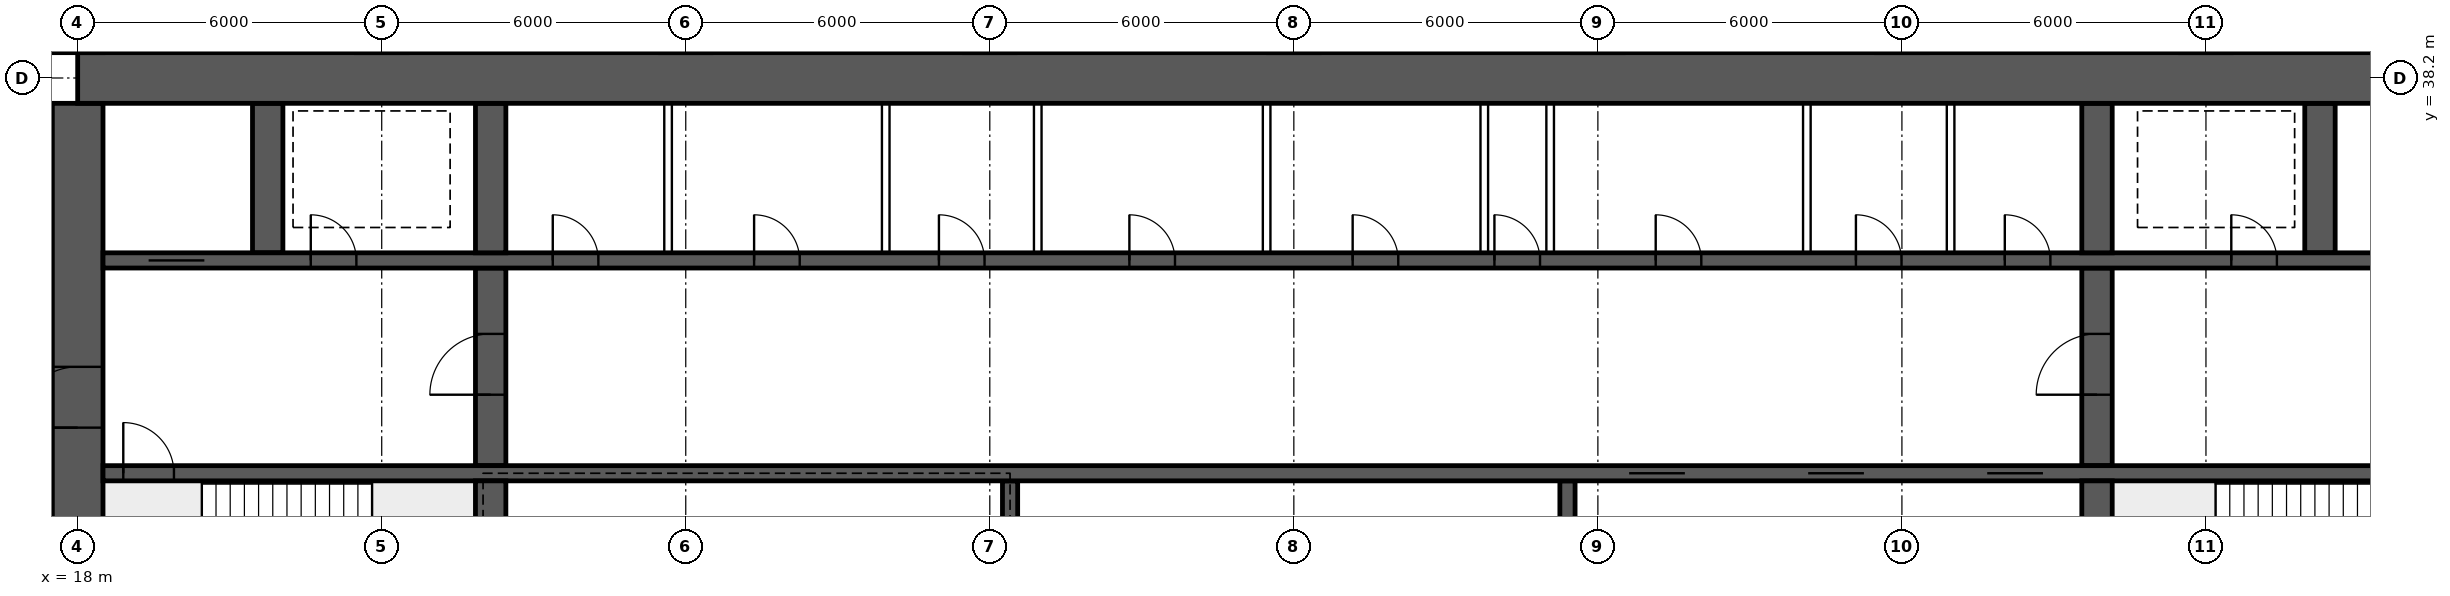
"""IFC4 building model, lengths in metres.
Left out: names, types, materials, properties, quantities, classifications, styles, units other than length and angle.
Written with IfcOpenShell. Run it as: python <this file> out.ifc"""

import sys

from ifc_helpers import new_model, si_unit, direction, frame, frame_2d, origin, place, context, subcontext, project, spatial, rectangle, extrude, element, fill, save


model = new_model("IFC4")
c1 = context("Model", 3, precision=1e-05, world=origin(), true_north=direction((0.0, 1.0)))
c2 = subcontext(c1, "Body", "Model", "MODEL_VIEW")
j1 = project(units=[si_unit("LENGTHUNIT", "METRE"), si_unit("PLANEANGLEUNIT", "RADIAN")], contexts=[c1])
p1 = place(None, origin())
s1 = spatial("IfcSite", under=j1, at=p1, CompositionType="ELEMENT")
p2 = place(p1, origin())
s2 = spatial("IfcBuilding", under=s1, at=p2, CompositionType="ELEMENT")
p3 = place(p2, frame((0.0, 0.0, -4.5)))
s3 = spatial("IfcBuildingStorey", under=s2, at=p3, CompositionType="ELEMENT", Elevation=-4.5)
p4 = place(p3, frame((18.0, 38.2, 0.0), z_axis=(0.0, 0.0, 1.0), x_axis=(1.0, 0.0, 0.0)))
e1 = element("IfcWall", 1, at=p4, inside=s3, PredefinedType="SHEAR", context=c2, shape_type="SweptSolid", body=[
    extrude(rectangle(XDim=48.0, YDim=1.0, at=frame_2d((24.0, 0.0))), origin(), (0.0, 0.0, 1.0), 4.5),
])
p5 = place(p3, frame((18.0, 26.3, 0.0), z_axis=(0.0, 0.0, 1.0), x_axis=(0.0, 1.0, 0.0)))
e2 = element("IfcWall", 2, at=p5, inside=s3, PredefinedType="SHEAR", context=c2, shape_type="SweptSolid", body=[
    extrude(rectangle(XDim=11.4, YDim=1.0, at=frame_2d((5.7, 0.0))), origin(), (0.0, 0.0, 1.0), 4.5),
])
p6 = place(p5, frame((5.0, 0.0, 0.0)))
e3 = element("IfcOpeningElement", 3, at=p6, cuts=e2, PredefinedType="OPENING", context=c2, shape_type="SweptSolid", body=[
    extrude(rectangle(XDim=1.2, YDim=2.1, at=frame_2d((0.6, 1.05))), frame((0.0, 0.51, 0.0), z_axis=(0.0, -1.0, 0.0), x_axis=(1.0, 0.0, 0.0)), (0.0, 0.0, 1.0), 1.02),
])
p7 = place(p3, frame((18.5, 30.4, 0.0), z_axis=(0.0, 0.0, 1.0), x_axis=(1.0, 0.0, 0.0)))
e4 = element("IfcWall", 4, at=p7, inside=s3, PredefinedType="SHEAR", context=c2, shape_type="SweptSolid", body=[
    extrude(rectangle(XDim=47.0, YDim=0.3, at=frame_2d((23.5, 0.0))), origin(), (0.0, 0.0, 1.0), 4.5),
])
p8 = place(p7, frame((0.4, 0.0, 0.0)))
e5 = element("IfcOpeningElement", 5, at=p8, cuts=e4, PredefinedType="OPENING", context=c2, shape_type="SweptSolid", body=[
    extrude(rectangle(XDim=1.0, YDim=2.1, at=frame_2d((0.5, 1.05))), frame((0.0, 0.16, 0.0), z_axis=(0.0, -1.0, 0.0), x_axis=(1.0, 0.0, 0.0)), (0.0, 0.0, 1.0), 0.32),
])
p9 = place(p7, frame((45.6, 0.0, 0.0)))
e6 = element("IfcOpeningElement", 6, at=p9, cuts=e4, PredefinedType="OPENING", context=c2, shape_type="SweptSolid", body=[
    extrude(rectangle(XDim=1.0, YDim=2.1, at=frame_2d((0.5, 1.05))), frame((0.0, 0.16, 0.0), z_axis=(0.0, -1.0, 0.0), x_axis=(1.0, 0.0, 0.0)), (0.0, 0.0, 1.0), 0.32),
])
p10 = place(p7, frame((30.117, 0.0, 0.0)))
e7 = element("IfcOpeningElement", 7, at=p10, cuts=e4, PredefinedType="OPENING", context=c2, shape_type="SweptSolid", body=[
    extrude(rectangle(XDim=1.1, YDim=2.1, at=frame_2d((0.55, 1.05))), frame((0.0, 0.16, 0.0), z_axis=(0.0, -1.0, 0.0), x_axis=(1.0, 0.0, 0.0)), (0.0, 0.0, 1.0), 0.32),
])
p11 = place(p7, frame((33.65, 0.0, 0.0)))
e8 = element("IfcOpeningElement", 8, at=p11, cuts=e4, PredefinedType="OPENING", context=c2, shape_type="SweptSolid", body=[
    extrude(rectangle(XDim=1.1, YDim=2.1, at=frame_2d((0.55, 1.05))), frame((0.0, 0.16, 0.0), z_axis=(0.0, -1.0, 0.0), x_axis=(1.0, 0.0, 0.0)), (0.0, 0.0, 1.0), 0.32),
])
p12 = place(p7, frame((37.183, 0.0, 0.0)))
e9 = element("IfcOpeningElement", 9, at=p12, cuts=e4, PredefinedType="OPENING", context=c2, shape_type="SweptSolid", body=[
    extrude(rectangle(XDim=1.1, YDim=2.1, at=frame_2d((0.55, 1.05))), frame((0.0, 0.16, 0.0), z_axis=(0.0, -1.0, 0.0), x_axis=(1.0, 0.0, 0.0)), (0.0, 0.0, 1.0), 0.32),
])
p13 = place(p3, frame((18.5, 34.6, 0.0), z_axis=(0.0, 0.0, 1.0), x_axis=(1.0, 0.0, 0.0)))
e10 = element("IfcWall", 10, at=p13, inside=s3, PredefinedType="SHEAR", context=c2, shape_type="SweptSolid", body=[
    extrude(rectangle(XDim=47.0, YDim=0.3, at=frame_2d((23.5, 0.0))), origin(), (0.0, 0.0, 1.0), 4.5),
])
p14 = place(p13, frame((0.9, 0.0, 0.0)))
e11 = element("IfcOpeningElement", 11, at=p14, cuts=e10, PredefinedType="OPENING", context=c2, shape_type="SweptSolid", body=[
    extrude(rectangle(XDim=1.1, YDim=2.1, at=frame_2d((0.55, 1.05))), frame((0.0, 0.16, 0.0), z_axis=(0.0, -1.0, 0.0), x_axis=(1.0, 0.0, 0.0)), (0.0, 0.0, 1.0), 0.32),
])
p15 = place(p13, frame((45.0, 0.0, 0.0)))
e12 = element("IfcOpeningElement", 12, at=p15, cuts=e10, PredefinedType="OPENING", context=c2, shape_type="SweptSolid", body=[
    extrude(rectangle(XDim=1.1, YDim=2.1, at=frame_2d((0.55, 1.05))), frame((0.0, 0.16, 0.0), z_axis=(0.0, -1.0, 0.0), x_axis=(1.0, 0.0, 0.0)), (0.0, 0.0, 1.0), 0.32),
])
p16 = place(p13, frame((4.1, 0.0, 0.0)))
e13 = element("IfcOpeningElement", 13, at=p16, cuts=e10, PredefinedType="OPENING", context=c2, shape_type="SweptSolid", body=[
    extrude(rectangle(XDim=0.9, YDim=2.1, at=frame_2d((0.45, 1.05))), frame((0.0, 0.16, 0.0), z_axis=(0.0, -1.0, 0.0), x_axis=(1.0, 0.0, 0.0)), (0.0, 0.0, 1.0), 0.32),
])
p17 = place(p13, frame((42.0, 0.0, 0.0)))
e14 = element("IfcOpeningElement", 14, at=p17, cuts=e10, PredefinedType="OPENING", context=c2, shape_type="SweptSolid", body=[
    extrude(rectangle(XDim=0.9, YDim=2.1, at=frame_2d((0.45, 1.05))), frame((0.0, 0.16, 0.0), z_axis=(0.0, -1.0, 0.0), x_axis=(1.0, 0.0, 0.0)), (0.0, 0.0, 1.0), 0.32),
])
p18 = place(p13, frame((8.875, 0.0, 0.0)))
e15 = element("IfcOpeningElement", 15, at=p18, cuts=e10, PredefinedType="OPENING", context=c2, shape_type="SweptSolid", body=[
    extrude(rectangle(XDim=0.9, YDim=2.1, at=frame_2d((0.45, 1.05))), frame((0.0, 0.16, 0.0), z_axis=(0.0, -1.0, 0.0), x_axis=(1.0, 0.0, 0.0)), (0.0, 0.0, 1.0), 0.32),
])
p19 = place(p13, frame((12.849, 0.0, 0.0)))
e16 = element("IfcOpeningElement", 16, at=p19, cuts=e10, PredefinedType="OPENING", context=c2, shape_type="SweptSolid", body=[
    extrude(rectangle(XDim=0.9, YDim=2.1, at=frame_2d((0.45, 1.05))), frame((0.0, 0.16, 0.0), z_axis=(0.0, -1.0, 0.0), x_axis=(1.0, 0.0, 0.0)), (0.0, 0.0, 1.0), 0.32),
])
p20 = place(p13, frame((16.496, 0.0, 0.0)))
e17 = element("IfcOpeningElement", 17, at=p20, cuts=e10, PredefinedType="OPENING", context=c2, shape_type="SweptSolid", body=[
    extrude(rectangle(XDim=0.9, YDim=2.1, at=frame_2d((0.45, 1.05))), frame((0.0, 0.16, 0.0), z_axis=(0.0, -1.0, 0.0), x_axis=(1.0, 0.0, 0.0)), (0.0, 0.0, 1.0), 0.32),
])
p21 = place(p13, frame((20.255, 0.0, 0.0)))
e18 = element("IfcOpeningElement", 18, at=p21, cuts=e10, PredefinedType="OPENING", context=c2, shape_type="SweptSolid", body=[
    extrude(rectangle(XDim=0.9, YDim=2.1, at=frame_2d((0.45, 1.05))), frame((0.0, 0.16, 0.0), z_axis=(0.0, -1.0, 0.0), x_axis=(1.0, 0.0, 0.0)), (0.0, 0.0, 1.0), 0.32),
])
p22 = place(p13, frame((24.661, 0.0, 0.0)))
e19 = element("IfcOpeningElement", 19, at=p22, cuts=e10, PredefinedType="OPENING", context=c2, shape_type="SweptSolid", body=[
    extrude(rectangle(XDim=0.9, YDim=2.1, at=frame_2d((0.45, 1.05))), frame((0.0, 0.16, 0.0), z_axis=(0.0, -1.0, 0.0), x_axis=(1.0, 0.0, 0.0)), (0.0, 0.0, 1.0), 0.32),
])
p23 = place(p13, frame((27.458, 0.0, 0.0)))
e20 = element("IfcOpeningElement", 20, at=p23, cuts=e10, PredefinedType="OPENING", context=c2, shape_type="SweptSolid", body=[
    extrude(rectangle(XDim=0.9, YDim=2.1, at=frame_2d((0.45, 1.05))), frame((0.0, 0.16, 0.0), z_axis=(0.0, -1.0, 0.0), x_axis=(1.0, 0.0, 0.0)), (0.0, 0.0, 1.0), 0.32),
])
p24 = place(p13, frame((30.641, 0.0, 0.0)))
e21 = element("IfcOpeningElement", 21, at=p24, cuts=e10, PredefinedType="OPENING", context=c2, shape_type="SweptSolid", body=[
    extrude(rectangle(XDim=0.9, YDim=2.1, at=frame_2d((0.45, 1.05))), frame((0.0, 0.16, 0.0), z_axis=(0.0, -1.0, 0.0), x_axis=(1.0, 0.0, 0.0)), (0.0, 0.0, 1.0), 0.32),
])
p25 = place(p13, frame((34.592, 0.0, 0.0)))
e22 = element("IfcOpeningElement", 22, at=p25, cuts=e10, PredefinedType="OPENING", context=c2, shape_type="SweptSolid", body=[
    extrude(rectangle(XDim=0.9, YDim=2.1, at=frame_2d((0.45, 1.05))), frame((0.0, 0.16, 0.0), z_axis=(0.0, -1.0, 0.0), x_axis=(1.0, 0.0, 0.0)), (0.0, 0.0, 1.0), 0.32),
])
p26 = place(p13, frame((37.53, 0.0, 0.0)))
e23 = element("IfcOpeningElement", 23, at=p26, cuts=e10, PredefinedType="OPENING", context=c2, shape_type="SweptSolid", body=[
    extrude(rectangle(XDim=0.9, YDim=2.1, at=frame_2d((0.45, 1.05))), frame((0.0, 0.16, 0.0), z_axis=(0.0, -1.0, 0.0), x_axis=(1.0, 0.0, 0.0)), (0.0, 0.0, 1.0), 0.32),
])
for number, where, z_axis, x_axis in (
    (24, (26.15, 26.3, 0.0), (0.0, 0.0, 1.0), (0.0, 1.0, 0.0)),
    (25, (57.85, 26.3, 0.0), (0.0, 0.0, 1.0), (0.0, 1.0, 0.0)),
):
    element("IfcWall", number, at=place(p3, frame(where, z_axis=z_axis, x_axis=x_axis)), inside=s3, PredefinedType="SHEAR", context=c2, shape_type="SweptSolid", body=[
        extrude(rectangle(XDim=3.95, YDim=0.6, at=frame_2d((1.975, 0.0))), origin(), (0.0, 0.0, 1.0), 4.5),
    ])
p27 = place(p3, frame((26.15, 30.55, 0.0), z_axis=(0.0, 0.0, 1.0), x_axis=(0.0, 1.0, 0.0)))
e26 = element("IfcWall", 26, at=p27, inside=s3, PredefinedType="SHEAR", context=c2, shape_type="SweptSolid", body=[
    extrude(rectangle(XDim=3.9, YDim=0.6, at=frame_2d((1.95, 0.0))), origin(), (0.0, 0.0, 1.0), 4.5),
])
p28 = place(p27, frame((1.4, 0.0, 0.0)))
e27 = element("IfcOpeningElement", 27, at=p28, cuts=e26, PredefinedType="OPENING", context=c2, shape_type="SweptSolid", body=[
    extrude(rectangle(XDim=1.2, YDim=2.1, at=frame_2d((0.6, 1.05))), frame((0.0, 0.31, 0.0), z_axis=(0.0, -1.0, 0.0), x_axis=(1.0, 0.0, 0.0)), (0.0, 0.0, 1.0), 0.62),
])
p29 = place(p3, frame((57.85, 30.55, 0.0), z_axis=(0.0, 0.0, 1.0), x_axis=(0.0, 1.0, 0.0)))
e28 = element("IfcWall", 28, at=p29, inside=s3, PredefinedType="SHEAR", context=c2, shape_type="SweptSolid", body=[
    extrude(rectangle(XDim=3.9, YDim=0.6, at=frame_2d((1.95, 0.0))), origin(), (0.0, 0.0, 1.0), 4.5),
])
p30 = place(p29, frame((1.4, 0.0, 0.0)))
e29 = element("IfcOpeningElement", 29, at=p30, cuts=e28, PredefinedType="OPENING", context=c2, shape_type="SweptSolid", body=[
    extrude(rectangle(XDim=1.2, YDim=2.1, at=frame_2d((0.6, 1.05))), frame((0.0, 0.31, 0.0), z_axis=(0.0, -1.0, 0.0), x_axis=(1.0, 0.0, 0.0)), (0.0, 0.0, 1.0), 0.62),
])
for number, where, z_axis, x_axis in (
    (30, (21.75, 34.75, 0.0), (0.0, 0.0, 1.0), (0.0, 1.0, 0.0)),
    (31, (62.25, 34.75, 0.0), (0.0, 0.0, 1.0), (0.0, 1.0, 0.0)),
    (32, (26.15, 34.75, 0.0), (0.0, 0.0, 1.0), (0.0, 1.0, 0.0)),
    (33, (57.85, 34.75, 0.0), (0.0, 0.0, 1.0), (0.0, 1.0, 0.0)),
):
    element("IfcWall", number, at=place(p3, frame(where, z_axis=z_axis, x_axis=x_axis)), inside=s3, PredefinedType="SHEAR", context=c2, shape_type="SweptSolid", body=[
        extrude(rectangle(XDim=2.95, YDim=0.6, at=frame_2d((1.475, 0.0))), origin(), (0.0, 0.0, 1.0), 4.5),
    ])
for number, where, z_axis, x_axis in (
    (34, (36.4, 26.3, 0.0), (0.0, 0.0, 1.0), (0.0, 1.0, 0.0)),
    (35, (47.4, 26.3, 0.0), (0.0, 0.0, 1.0), (0.0, 1.0, 0.0)),
):
    element("IfcWall", number, at=place(p3, frame(where, z_axis=z_axis, x_axis=x_axis)), inside=s3, PredefinedType="SHEAR", context=c2, shape_type="SweptSolid", body=[
        extrude(rectangle(XDim=3.95, YDim=0.3, at=frame_2d((1.975, 0.0))), origin(), (0.0, 0.0, 1.0), 4.5),
    ])
for number, where, z_axis, x_axis in (
    (36, (29.651, 34.75, 0.0), (0.0, 0.0, 1.0), (0.0, 1.0, 0.0)),
    (37, (33.946, 34.75, 0.0), (0.0, 0.0, 1.0), (0.0, 1.0, 0.0)),
    (38, (36.946, 34.75, 0.0), (0.0, 0.0, 1.0), (0.0, 1.0, 0.0)),
    (39, (41.463, 34.75, 0.0), (0.0, 0.0, 1.0), (0.0, 1.0, 0.0)),
    (40, (45.758, 34.75, 0.0), (0.0, 0.0, 1.0), (0.0, 1.0, 0.0)),
    (41, (47.058, 34.75, 0.0), (0.0, 0.0, 1.0), (0.0, 1.0, 0.0)),
    (42, (52.124, 34.75, 0.0), (0.0, 0.0, 1.0), (0.0, 1.0, 0.0)),
    (43, (54.961, 34.75, 0.0), (0.0, 0.0, 1.0), (0.0, 1.0, 0.0)),
):
    element("IfcWall", number, at=place(p3, frame(where, z_axis=z_axis, x_axis=x_axis)), inside=s3, PredefinedType="SOLIDWALL", context=c2, shape_type="SweptSolid", body=[
        extrude(rectangle(XDim=2.95, YDim=0.15, at=frame_2d((1.475, 0.0))), origin(), (0.0, 0.0, 1.0), 4.15),
    ])
p31 = place(p3, frame((34.05, 38.5, 0.0), z_axis=(0.0, 0.0, 1.0), x_axis=(0.0, 1.0, 0.0)))
e44 = element("IfcWall", 44, at=p31, inside=s3, PredefinedType="SOLIDWALL", context=c2, shape_type="SweptSolid", body=[
    extrude(rectangle(XDim=10.7, YDim=0.25, at=frame_2d((5.35, 0.0))), origin(), (0.0, 0.0, 1.0), 4.15),
])
p32 = place(p31, frame((8.8, 0.0, 0.0)))
e45 = element("IfcOpeningElement", 45, at=p32, cuts=e44, PredefinedType="OPENING", context=c2, shape_type="SweptSolid", body=[
    extrude(rectangle(XDim=0.9, YDim=2.1, at=frame_2d((0.45, 1.05))), frame((0.0, 0.135, 0.0), z_axis=(0.0, -1.0, 0.0), x_axis=(1.0, 0.0, 0.0)), (0.0, 0.0, 1.0), 0.27),
])
p33 = place(p6, origin())
e46 = element("IfcDoor", 46, at=p33, inside=s3, OperationType="SINGLE_SWING_LEFT", PredefinedType="DOOR", context=c2, shape_type="SweptSolid", body=[
    extrude(rectangle(XDim=1.2, YDim=2.1, at=frame_2d((0.6, 1.05))), frame((0.0, 0.025, 0.0), z_axis=(0.0, -1.0, 0.0), x_axis=(1.0, 0.0, 0.0)), (0.0, 0.0, 1.0), 0.05),
])
fill(e3, e46)
p34 = place(p8, origin())
e47 = element("IfcDoor", 47, at=p34, inside=s3, OperationType="SINGLE_SWING_LEFT", PredefinedType="DOOR", context=c2, shape_type="SweptSolid", body=[
    extrude(rectangle(XDim=1.0, YDim=2.1, at=frame_2d((0.5, 1.05))), frame((0.0, 0.025, 0.0), z_axis=(0.0, -1.0, 0.0), x_axis=(1.0, 0.0, 0.0)), (0.0, 0.0, 1.0), 0.05),
])
fill(e5, e47)
p35 = place(p14, origin())
e48 = element("IfcDoor", 48, at=p35, inside=s3, OperationType="DOUBLE_DOOR_SLIDING", PredefinedType="DOOR", context=c2, shape_type="SweptSolid", body=[
    extrude(rectangle(XDim=1.1, YDim=2.1, at=frame_2d((0.55, 1.05))), frame((0.0, 0.025, 0.0), z_axis=(0.0, -1.0, 0.0), x_axis=(1.0, 0.0, 0.0)), (0.0, 0.0, 1.0), 0.05),
])
fill(e11, e48)
p36 = place(p16, origin())
e49 = element("IfcDoor", 49, at=p36, inside=s3, OperationType="SINGLE_SWING_LEFT", PredefinedType="DOOR", context=c2, shape_type="SweptSolid", body=[
    extrude(rectangle(XDim=0.9, YDim=2.1, at=frame_2d((0.45, 1.05))), frame((0.0, 0.025, 0.0), z_axis=(0.0, -1.0, 0.0), x_axis=(1.0, 0.0, 0.0)), (0.0, 0.0, 1.0), 0.05),
])
fill(e13, e49)
p37 = place(p17, origin())
e50 = element("IfcDoor", 50, at=p37, inside=s3, OperationType="SINGLE_SWING_LEFT", PredefinedType="DOOR", context=c2, shape_type="SweptSolid", body=[
    extrude(rectangle(XDim=0.9, YDim=2.1, at=frame_2d((0.45, 1.05))), frame((0.0, 0.025, 0.0), z_axis=(0.0, -1.0, 0.0), x_axis=(1.0, 0.0, 0.0)), (0.0, 0.0, 1.0), 0.05),
])
fill(e14, e50)
p38 = place(p28, origin())
e51 = element("IfcDoor", 51, at=p38, inside=s3, OperationType="SINGLE_SWING_LEFT", PredefinedType="DOOR", context=c2, shape_type="SweptSolid", body=[
    extrude(rectangle(XDim=1.2, YDim=2.1, at=frame_2d((0.6, 1.05))), frame((0.0, 0.025, 0.0), z_axis=(0.0, -1.0, 0.0), x_axis=(1.0, 0.0, 0.0)), (0.0, 0.0, 1.0), 0.05),
])
fill(e27, e51)
p39 = place(p30, origin())
e52 = element("IfcDoor", 52, at=p39, inside=s3, OperationType="SINGLE_SWING_LEFT", PredefinedType="DOOR", context=c2, shape_type="SweptSolid", body=[
    extrude(rectangle(XDim=1.2, YDim=2.1, at=frame_2d((0.6, 1.05))), frame((0.0, 0.025, 0.0), z_axis=(0.0, -1.0, 0.0), x_axis=(1.0, 0.0, 0.0)), (0.0, 0.0, 1.0), 0.05),
])
fill(e29, e52)
p40 = place(p18, origin())
e53 = element("IfcDoor", 53, at=p40, inside=s3, OperationType="SINGLE_SWING_LEFT", PredefinedType="DOOR", context=c2, shape_type="SweptSolid", body=[
    extrude(rectangle(XDim=0.9, YDim=2.1, at=frame_2d((0.45, 1.05))), frame((0.0, 0.025, 0.0), z_axis=(0.0, -1.0, 0.0), x_axis=(1.0, 0.0, 0.0)), (0.0, 0.0, 1.0), 0.05),
])
fill(e15, e53)
p41 = place(p19, origin())
e54 = element("IfcDoor", 54, at=p41, inside=s3, OperationType="SINGLE_SWING_LEFT", PredefinedType="DOOR", context=c2, shape_type="SweptSolid", body=[
    extrude(rectangle(XDim=0.9, YDim=2.1, at=frame_2d((0.45, 1.05))), frame((0.0, 0.025, 0.0), z_axis=(0.0, -1.0, 0.0), x_axis=(1.0, 0.0, 0.0)), (0.0, 0.0, 1.0), 0.05),
])
fill(e16, e54)
p42 = place(p20, origin())
e55 = element("IfcDoor", 55, at=p42, inside=s3, OperationType="SINGLE_SWING_LEFT", PredefinedType="DOOR", context=c2, shape_type="SweptSolid", body=[
    extrude(rectangle(XDim=0.9, YDim=2.1, at=frame_2d((0.45, 1.05))), frame((0.0, 0.025, 0.0), z_axis=(0.0, -1.0, 0.0), x_axis=(1.0, 0.0, 0.0)), (0.0, 0.0, 1.0), 0.05),
])
fill(e17, e55)
p43 = place(p21, origin())
e56 = element("IfcDoor", 56, at=p43, inside=s3, OperationType="SINGLE_SWING_LEFT", PredefinedType="DOOR", context=c2, shape_type="SweptSolid", body=[
    extrude(rectangle(XDim=0.9, YDim=2.1, at=frame_2d((0.45, 1.05))), frame((0.0, 0.025, 0.0), z_axis=(0.0, -1.0, 0.0), x_axis=(1.0, 0.0, 0.0)), (0.0, 0.0, 1.0), 0.05),
])
fill(e18, e56)
p44 = place(p22, origin())
e57 = element("IfcDoor", 57, at=p44, inside=s3, OperationType="SINGLE_SWING_LEFT", PredefinedType="DOOR", context=c2, shape_type="SweptSolid", body=[
    extrude(rectangle(XDim=0.9, YDim=2.1, at=frame_2d((0.45, 1.05))), frame((0.0, 0.025, 0.0), z_axis=(0.0, -1.0, 0.0), x_axis=(1.0, 0.0, 0.0)), (0.0, 0.0, 1.0), 0.05),
])
fill(e19, e57)
p45 = place(p23, origin())
e58 = element("IfcDoor", 58, at=p45, inside=s3, OperationType="SINGLE_SWING_LEFT", PredefinedType="DOOR", context=c2, shape_type="SweptSolid", body=[
    extrude(rectangle(XDim=0.9, YDim=2.1, at=frame_2d((0.45, 1.05))), frame((0.0, 0.025, 0.0), z_axis=(0.0, -1.0, 0.0), x_axis=(1.0, 0.0, 0.0)), (0.0, 0.0, 1.0), 0.05),
])
fill(e20, e58)
p46 = place(p24, origin())
e59 = element("IfcDoor", 59, at=p46, inside=s3, OperationType="SINGLE_SWING_LEFT", PredefinedType="DOOR", context=c2, shape_type="SweptSolid", body=[
    extrude(rectangle(XDim=0.9, YDim=2.1, at=frame_2d((0.45, 1.05))), frame((0.0, 0.025, 0.0), z_axis=(0.0, -1.0, 0.0), x_axis=(1.0, 0.0, 0.0)), (0.0, 0.0, 1.0), 0.05),
])
fill(e21, e59)
p47 = place(p25, origin())
e60 = element("IfcDoor", 60, at=p47, inside=s3, OperationType="SINGLE_SWING_LEFT", PredefinedType="DOOR", context=c2, shape_type="SweptSolid", body=[
    extrude(rectangle(XDim=0.9, YDim=2.1, at=frame_2d((0.45, 1.05))), frame((0.0, 0.025, 0.0), z_axis=(0.0, -1.0, 0.0), x_axis=(1.0, 0.0, 0.0)), (0.0, 0.0, 1.0), 0.05),
])
fill(e22, e60)
p48 = place(p26, origin())
e61 = element("IfcDoor", 61, at=p48, inside=s3, OperationType="SINGLE_SWING_LEFT", PredefinedType="DOOR", context=c2, shape_type="SweptSolid", body=[
    extrude(rectangle(XDim=0.9, YDim=2.1, at=frame_2d((0.45, 1.05))), frame((0.0, 0.025, 0.0), z_axis=(0.0, -1.0, 0.0), x_axis=(1.0, 0.0, 0.0)), (0.0, 0.0, 1.0), 0.05),
])
fill(e23, e61)
p49 = place(p10, origin())
e62 = element("IfcDoor", 62, at=p49, inside=s3, OperationType="DOUBLE_DOOR_SLIDING", PredefinedType="DOOR", context=c2, shape_type="SweptSolid", body=[
    extrude(rectangle(XDim=1.1, YDim=2.1, at=frame_2d((0.55, 1.05))), frame((0.0, 0.025, 0.0), z_axis=(0.0, -1.0, 0.0), x_axis=(1.0, 0.0, 0.0)), (0.0, 0.0, 1.0), 0.05),
])
fill(e7, e62)
p50 = place(p11, origin())
e63 = element("IfcDoor", 63, at=p50, inside=s3, OperationType="DOUBLE_DOOR_SLIDING", PredefinedType="DOOR", context=c2, shape_type="SweptSolid", body=[
    extrude(rectangle(XDim=1.1, YDim=2.1, at=frame_2d((0.55, 1.05))), frame((0.0, 0.025, 0.0), z_axis=(0.0, -1.0, 0.0), x_axis=(1.0, 0.0, 0.0)), (0.0, 0.0, 1.0), 0.05),
])
fill(e8, e63)
p51 = place(p12, origin())
e64 = element("IfcDoor", 64, at=p51, inside=s3, OperationType="DOUBLE_DOOR_SLIDING", PredefinedType="DOOR", context=c2, shape_type="SweptSolid", body=[
    extrude(rectangle(XDim=1.1, YDim=2.1, at=frame_2d((0.55, 1.05))), frame((0.0, 0.025, 0.0), z_axis=(0.0, -1.0, 0.0), x_axis=(1.0, 0.0, 0.0)), (0.0, 0.0, 1.0), 0.05),
])
fill(e9, e64)
save(model, sys.argv[1])
